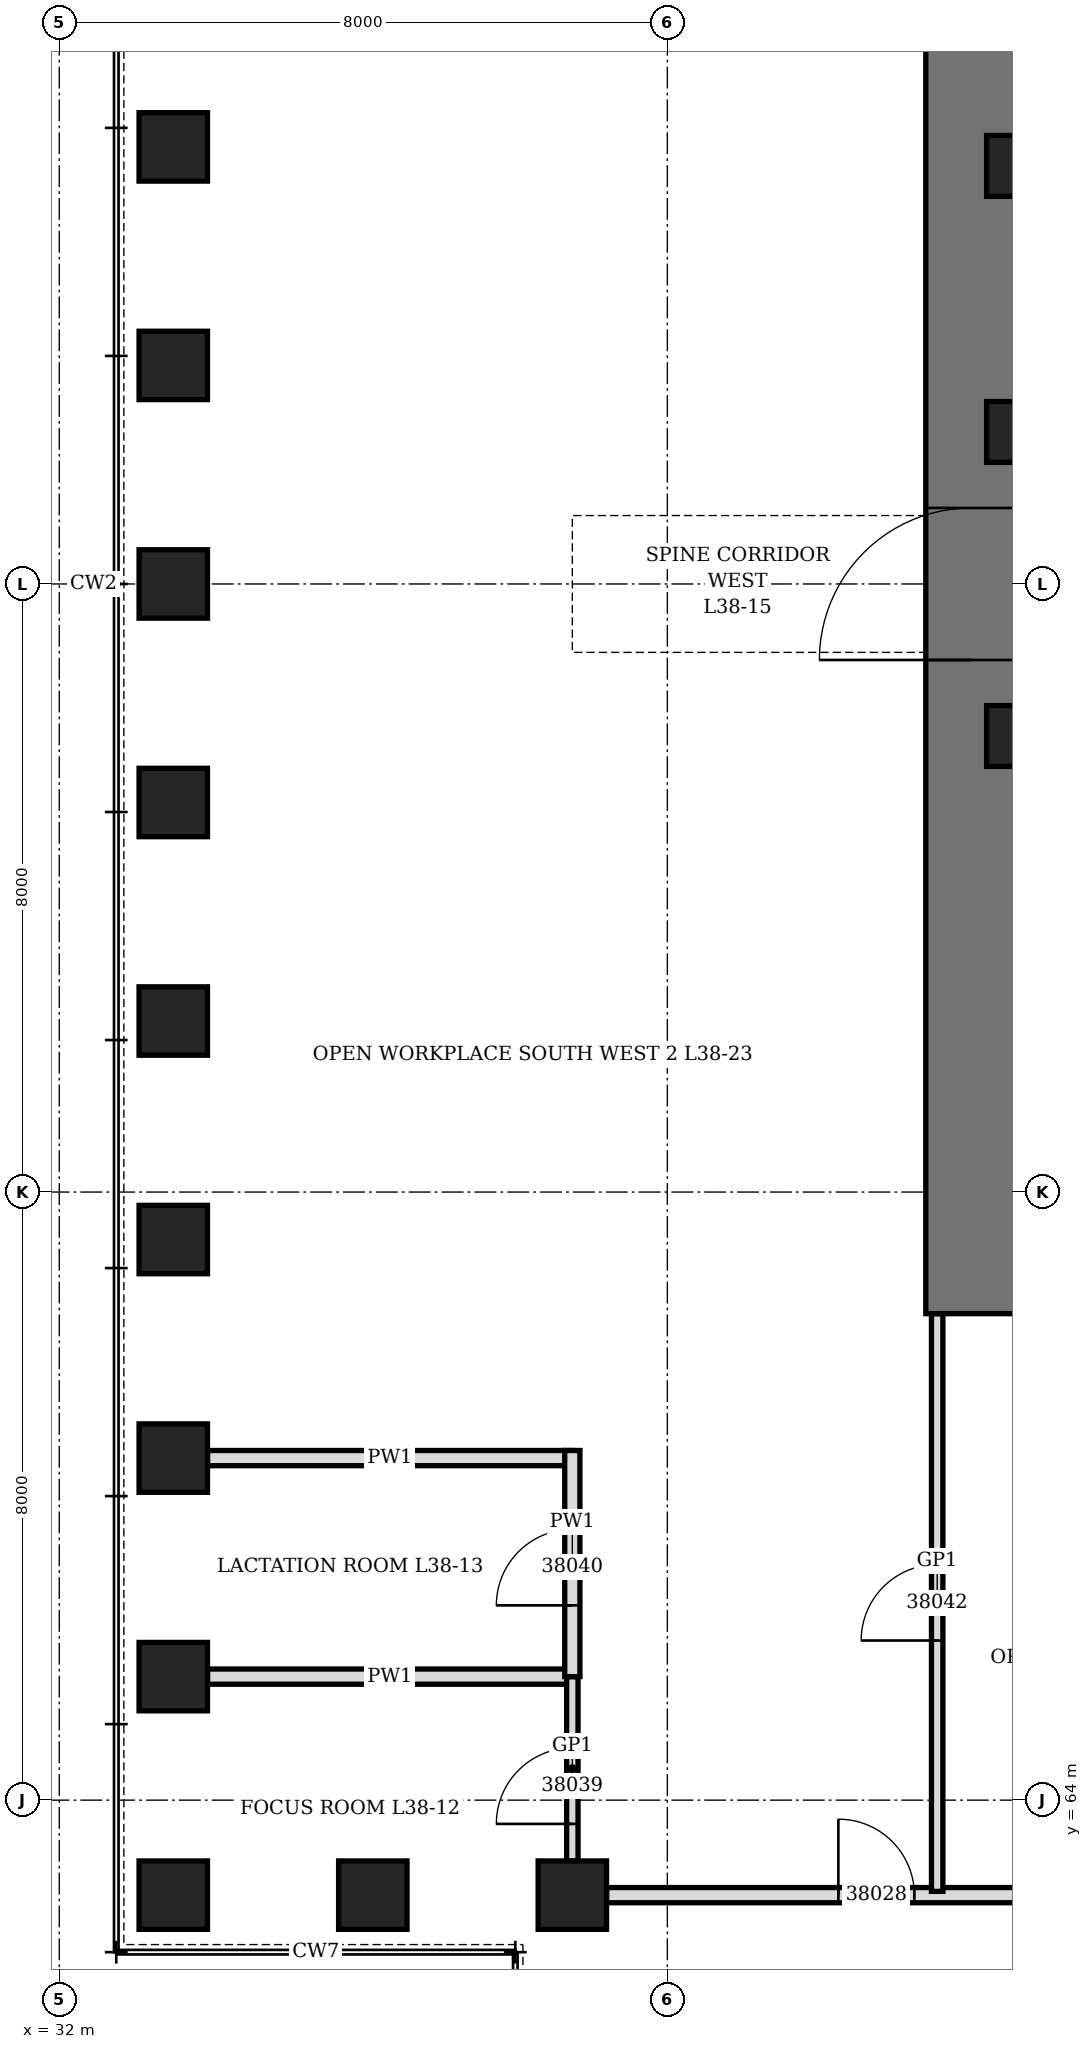
"""IFC4 building model, lengths in metres.
Left out: names, types, materials, properties, quantities, classifications, styles, units other than length and angle.
Written with IfcOpenShell. Run it as: python <this file> out.ifc"""

import sys

from ifc_helpers import new_model, si_unit, direction, frame, frame_2d, origin, origin_2d, place, context, subcontext, project, spatial, rectangle, hollow_rectangle, extrude, element, fill, save


model = new_model("IFC4")
c1 = context("Model", 3, precision=1e-05, world=origin(), true_north=direction((0.0, 1.0)))
c2 = subcontext(c1, "Body", "Model", "MODEL_VIEW")
j1 = project(units=[si_unit("LENGTHUNIT", "METRE"), si_unit("PLANEANGLEUNIT", "RADIAN")], contexts=[c1])
p1 = place(None, origin())
s1 = spatial("IfcSite", under=j1, at=p1, CompositionType="ELEMENT")
p2 = place(p1, origin())
s2 = spatial("IfcBuilding", under=s1, at=p2, CompositionType="ELEMENT")
p3 = place(p2, frame((0.0, 0.0, 171.1)))
s3 = spatial("IfcBuildingStorey", under=s2, at=p3, CompositionType="ELEMENT", Elevation=171.1)
for number, where, z_axis, x_axis in (
    (1, (33.5, 85.75, 0.0), (0.0, 0.0, 1.0), (0.0, 1.0, 0.0)),
    (2, (33.5, 82.875, 0.0), (0.0, 0.0, 1.0), (0.0, 1.0, 0.0)),
    (3, (33.5, 80.0, 0.0), (0.0, 0.0, 1.0), (0.0, 1.0, 0.0)),
    (4, (33.5, 77.125, 0.0), (0.0, 0.0, 1.0), (0.0, 1.0, 0.0)),
    (5, (33.5, 74.25, 0.0), (0.0, 0.0, 1.0), (0.0, 1.0, 0.0)),
    (6, (33.5, 71.375, 0.0), (0.0, 0.0, 1.0), (0.0, 1.0, 0.0)),
    (7, (33.5, 68.5, 0.0), (0.0, 0.0, 1.0), (0.0, 1.0, 0.0)),
    (8, (33.5, 65.625, 0.0), (0.0, 0.0, 1.0), (0.0, 1.0, 0.0)),
    (9, (33.5, 62.75, 0.0), (0.0, 0.0, 1.0), (1.0, 0.0, 0.0)),
    (10, (36.125, 62.75, 0.0), (0.0, 0.0, 1.0), (1.0, 0.0, 0.0)),
    (11, (38.75, 62.75, 0.0), (0.0, 0.0, 1.0), (0.0, 1.0, 0.0)),
):
    element("IfcColumn", number, at=place(p3, frame(where, z_axis=z_axis, x_axis=x_axis)), inside=s3, PredefinedType="COLUMN", context=c2, shape_type="SweptSolid", body=[
        extrude(hollow_rectangle(XDim=0.9, YDim=0.9, WallThickness=0.12, at=origin_2d()), origin(), (0.0, 0.0, 1.0), 4.2),
    ])
p4 = place(p3, frame((44.0, 70.4, 0.0), z_axis=(0.0, 0.0, 1.0), x_axis=(0.0, 1.0, 0.0)))
e12 = element("IfcWall", 12, at=p4, inside=s3, PredefinedType="SHEAR", context=c2, shape_type="SweptSolid", body=[
    extrude(rectangle(XDim=19.2, YDim=1.2, at=frame_2d((9.6, 0.0))), origin(), (0.0, 0.0, 1.0), 4.2),
])
p5 = place(p4, frame((8.6, 0.0, 0.0)))
e13 = element("IfcOpeningElement", 13, at=p5, cuts=e12, PredefinedType="OPENING", context=c2, shape_type="SweptSolid", body=[
    extrude(rectangle(XDim=2.0, YDim=2.4, at=frame_2d((1.0, 1.2))), frame((0.0, 0.61, 0.0), z_axis=(0.0, -1.0, 0.0), x_axis=(1.0, 0.0, 0.0)), (0.0, 0.0, 1.0), 1.22),
])
for number, where, z_axis, x_axis in (
    (14, (44.6, 78.0, 0.0), (0.0, 0.0, 1.0), (1.0, 0.0, 0.0)),
    (15, (44.6, 82.0, 0.0), (0.0, 0.0, 1.0), (1.0, 0.0, 0.0)),
    (16, (44.6, 85.5, 0.0), (0.0, 0.0, 1.0), (1.0, 0.0, 0.0)),
):
    element("IfcColumn", number, at=place(p3, frame(where, z_axis=z_axis, x_axis=x_axis)), inside=s3, PredefinedType="COLUMN", context=c2, shape_type="SweptSolid", body=[
        extrude(hollow_rectangle(XDim=0.8, YDim=0.8, WallThickness=0.1, at=origin_2d()), origin(), (0.0, 0.0, 1.0), 4.2),
    ])
for number, where, z_axis, x_axis in (
    (17, (33.95, 65.625, 0.0), (0.0, 0.0, 1.0), (1.0, 0.0, 0.0)),
    (18, (33.95, 68.5, 0.0), (0.0, 0.0, 1.0), (1.0, 0.0, 0.0)),
):
    element("IfcWall", number, at=place(p3, frame(where, z_axis=z_axis, x_axis=x_axis)), inside=s3, PredefinedType="PARTITIONING", context=c2, shape_type="SweptSolid", body=[
        extrude(rectangle(XDim=4.8, YDim=0.2, at=frame_2d((2.4, 0.0))), origin(), (0.0, 0.0, 1.0), 3.188),
    ])
p6 = place(p3, frame((39.2, 62.75, 0.0), z_axis=(0.0, 0.0, 1.0), x_axis=(1.0, 0.0, 0.0)))
e19 = element("IfcWall", 19, at=p6, inside=s3, PredefinedType="PARTITIONING", context=c2, shape_type="SweptSolid", body=[
    extrude(rectangle(XDim=25.525, YDim=0.2, at=frame_2d((12.763, 0.0))), origin(), (0.0, 0.0, 1.0), 3.95),
])
p7 = place(p6, frame((3.05, 0.0, 0.0)))
e20 = element("IfcOpeningElement", 20, at=p7, cuts=e19, PredefinedType="OPENING", context=c2, shape_type="SweptSolid", body=[
    extrude(rectangle(XDim=1.0, YDim=2.1, at=frame_2d((0.5, 1.05))), frame((0.0, 0.11, 0.0), z_axis=(0.0, -1.0, 0.0), x_axis=(1.0, 0.0, 0.0)), (0.0, 0.0, 1.0), 0.22),
])
p8 = place(p6, frame((11.988, 0.0, 0.0)))
e21 = element("IfcOpeningElement", 21, at=p8, cuts=e19, PredefinedType="OPENING", context=c2, shape_type="SweptSolid", body=[
    extrude(rectangle(XDim=1.0, YDim=2.1, at=frame_2d((0.5, 1.05))), frame((0.0, 0.11, 0.0), z_axis=(0.0, -1.0, 0.0), x_axis=(1.0, 0.0, 0.0)), (0.0, 0.0, 1.0), 0.22),
])
p9 = place(p6, frame((20.613, 0.0, 0.0)))
e22 = element("IfcOpeningElement", 22, at=p9, cuts=e19, PredefinedType="OPENING", context=c2, shape_type="SweptSolid", body=[
    extrude(rectangle(XDim=1.0, YDim=2.1, at=frame_2d((0.5, 1.05))), frame((0.0, 0.11, 0.0), z_axis=(0.0, -1.0, 0.0), x_axis=(1.0, 0.0, 0.0)), (0.0, 0.0, 1.0), 0.22),
])
p10 = place(p3, frame((38.75, 63.2, 0.0), z_axis=(0.0, 0.0, 1.0), x_axis=(0.0, 1.0, 0.0)))
e23 = element("IfcWall", 23, at=p10, inside=s3, PredefinedType="PARTITIONING", context=c2, shape_type="SweptSolid", body=[
    extrude(rectangle(XDim=2.425, YDim=0.15, at=frame_2d((1.212, 0.0))), origin(), (0.0, 0.0, 1.0), 3.95),
])
p11 = place(p10, frame((0.488, 0.0, 0.0)))
e24 = element("IfcOpeningElement", 24, at=p11, cuts=e23, PredefinedType="OPENING", context=c2, shape_type="SweptSolid", body=[
    extrude(rectangle(XDim=1.0, YDim=2.4, at=frame_2d((0.5, 1.2))), frame((0.0, 0.085, 0.0), z_axis=(0.0, -1.0, 0.0), x_axis=(1.0, 0.0, 0.0)), (0.0, 0.0, 1.0), 0.17),
])
p12 = place(p3, frame((38.75, 65.625, 0.0), z_axis=(0.0, 0.0, 1.0), x_axis=(0.0, 1.0, 0.0)))
e25 = element("IfcWall", 25, at=p12, inside=s3, PredefinedType="PARTITIONING", context=c2, shape_type="SweptSolid", body=[
    extrude(rectangle(XDim=2.975, YDim=0.2, at=frame_2d((1.488, 0.0))), origin(), (0.0, 0.0, 1.0), 3.95),
])
p13 = place(p12, frame((0.938, 0.0, 0.0)))
e26 = element("IfcOpeningElement", 26, at=p13, cuts=e25, PredefinedType="OPENING", context=c2, shape_type="SweptSolid", body=[
    extrude(rectangle(XDim=1.0, YDim=2.1, at=frame_2d((0.5, 1.05))), frame((0.0, 0.11, 0.0), z_axis=(0.0, -1.0, 0.0), x_axis=(1.0, 0.0, 0.0)), (0.0, 0.0, 1.0), 0.22),
])
p14 = place(p3, frame((43.55, 62.8, 0.0), z_axis=(0.0, 0.0, 1.0), x_axis=(0.0, 1.0, 0.0)))
e27 = element("IfcWall", 27, at=p14, inside=s3, PredefinedType="PARTITIONING", context=c2, shape_type="SweptSolid", body=[
    extrude(rectangle(XDim=7.6, YDim=0.15, at=frame_2d((3.8, 0.0))), origin(), (0.0, 0.0, 1.0), 3.95),
])
p15 = place(p14, frame((3.3, 0.0, 0.0)))
e28 = element("IfcOpeningElement", 28, at=p15, cuts=e27, PredefinedType="OPENING", context=c2, shape_type="SweptSolid", body=[
    extrude(rectangle(XDim=1.0, YDim=2.4, at=frame_2d((0.5, 1.2))), frame((0.0, 0.085, 0.0), z_axis=(0.0, -1.0, 0.0), x_axis=(1.0, 0.0, 0.0)), (0.0, 0.0, 1.0), 0.17),
])
p16 = place(p5, origin())
e29 = element("IfcDoor", 29, at=p16, inside=s3, OperationType="DOUBLE_DOOR_SINGLE_SWING", PredefinedType="DOOR", context=c2, shape_type="SweptSolid", body=[
    extrude(rectangle(XDim=2.0, YDim=2.4, at=frame_2d((1.0, 1.2))), frame((0.0, 0.35, 0.0), z_axis=(0.0, -1.0, 0.0), x_axis=(1.0, 0.0, 0.0)), (0.0, 0.0, 1.0), 0.7),
])
fill(e13, e29)
p17 = place(p7, origin())
e30 = element("IfcDoor", 30, at=p17, inside=s3, OperationType="SINGLE_SWING_LEFT", PredefinedType="DOOR", context=c2, shape_type="SweptSolid", body=[
    extrude(rectangle(XDim=1.0, YDim=2.1, at=frame_2d((0.5, 1.05))), frame((0.0, 0.1, 0.0), z_axis=(0.0, -1.0, 0.0), x_axis=(1.0, 0.0, 0.0)), (0.0, 0.0, 1.0), 0.199),
])
fill(e20, e30)
p18 = place(p11, origin())
e31 = element("IfcDoor", 31, at=p18, inside=s3, OperationType="SINGLE_SWING_RIGHT", PredefinedType="DOOR", context=c2, shape_type="SweptSolid", body=[
    extrude(rectangle(XDim=1.0, YDim=2.4, at=frame_2d((0.5, 1.2))), frame((0.0, 0.075, 0.0), z_axis=(0.0, -1.0, 0.0), x_axis=(1.0, 0.0, 0.0)), (0.0, 0.0, 1.0), 0.149),
])
fill(e24, e31)
p19 = place(p13, origin())
e32 = element("IfcDoor", 32, at=p19, inside=s3, OperationType="SINGLE_SWING_LEFT", PredefinedType="DOOR", context=c2, shape_type="SweptSolid", body=[
    extrude(rectangle(XDim=1.0, YDim=2.1, at=frame_2d((0.5, 1.05))), frame((0.0, 0.1, 0.0), z_axis=(0.0, -1.0, 0.0), x_axis=(1.0, 0.0, 0.0)), (0.0, 0.0, 1.0), 0.199),
])
fill(e26, e32)
p20 = place(p15, origin())
e33 = element("IfcDoor", 33, at=p20, inside=s3, OperationType="SINGLE_SWING_RIGHT", PredefinedType="DOOR", context=c2, shape_type="SweptSolid", body=[
    extrude(rectangle(XDim=1.0, YDim=2.4, at=frame_2d((0.5, 1.2))), frame((0.0, 0.075, 0.0), z_axis=(0.0, -1.0, 0.0), x_axis=(1.0, 0.0, 0.0)), (0.0, 0.0, 1.0), 0.149),
])
fill(e28, e33)
save(model, sys.argv[1])
